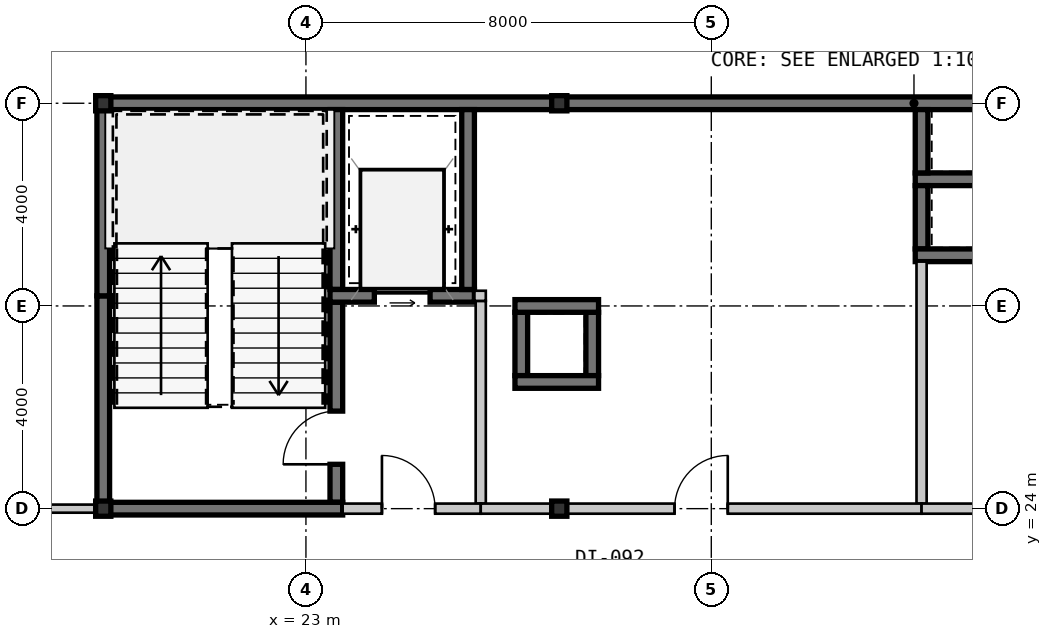
"""IFC4 building model, lengths in metres.
Left out: names, types, materials, properties, quantities, classifications, styles, units other than length and angle.
Written with IfcOpenShell. Run it as: python <this file> out.ifc"""

import sys

from ifc_helpers import new_model, si_unit, direction, frame, frame_2d, origin, origin_2d, place, context, subcontext, project, spatial, rectangle, hollow_rectangle, extrude, source, transform, mapped, element, fill, save


model = new_model("IFC4")
c1 = context("Model", 3, precision=1e-05, world=origin(), true_north=direction((0.0, 1.0)))
c2 = subcontext(c1, "Body", "Model", "MODEL_VIEW")
j1 = project(units=[si_unit("LENGTHUNIT", "METRE"), si_unit("PLANEANGLEUNIT", "RADIAN")], contexts=[c1])
p1 = place(None, origin())
s1 = spatial("IfcSite", under=j1, at=p1, CompositionType="ELEMENT")
p2 = place(p1, origin())
s2 = spatial("IfcBuilding", under=s1, at=p2, CompositionType="ELEMENT")
p3 = place(p2, frame((0.0, 0.0, 249.2)))
s3 = spatial("IfcBuildingStorey", under=s2, at=p3, CompositionType="ELEMENT", Elevation=249.2)
m1 = source(origin(), c2, "Body", "SweptSolid", [
    extrude(hollow_rectangle(XDim=0.3, YDim=0.3, WallThickness=0.012, at=origin_2d()), origin(), (0.0, 0.0, 1.0), 3.85),
])
for number, where, z_axis, x_axis in (
    (1, (19.0, 24.0, 0.0), (0.0, 0.0, 1.0), (1.0, 0.0, 0.0)),
    (2, (28.0, 24.0, 0.0), (0.0, 0.0, 1.0), (1.0, 0.0, 0.0)),
    (3, (19.0, 32.0, 0.0), (0.0, 0.0, 1.0), (1.0, 0.0, 0.0)),
    (4, (28.0, 32.0, 0.0), (0.0, 0.0, 1.0), (1.0, 0.0, 0.0)),
):
    element("IfcColumn", number, at=place(p3, frame(where, z_axis=z_axis, x_axis=x_axis)), inside=s3, PredefinedType="COLUMN", context=c2, shape_type="MappedRepresentation", body=[
        mapped(m1, transform((0.0, 0.0, 0.0), scale=1.0)),
    ])
m2 = source(origin(), c2, "Body", "SweptSolid", [
    extrude(rectangle(XDim=9.125, YDim=0.25, at=frame_2d((4.562, 0.0))), origin(), (0.0, 0.0, 1.0), 3.57),
])
p4 = place(p3, frame((18.875, 32.0, 0.0), z_axis=(0.0, 0.0, 1.0), x_axis=(1.0, 0.0, 0.0)))
e5 = element("IfcWall", 5, at=p4, inside=s3, PredefinedType="SHEAR", context=c2, shape_type="MappedRepresentation", body=[
    mapped(m2, transform((0.0, 0.0, 0.0), scale=1.0)),
])
m3 = source(origin(), c2, "Body", "SweptSolid", [
    extrude(rectangle(XDim=11.2, YDim=0.25, at=frame_2d((5.6, 0.0))), origin(), (0.0, 0.0, 1.0), 3.57),
])
p5 = place(p3, frame((28.0, 32.0, 0.0), z_axis=(0.0, 0.0, 1.0), x_axis=(1.0, 0.0, 0.0)))
e6 = element("IfcWall", 6, at=p5, inside=s3, PredefinedType="SHEAR", context=c2, shape_type="MappedRepresentation", body=[
    mapped(m3, transform((0.0, 0.0, 0.0), scale=1.0)),
])
m4 = source(origin(), c2, "Body", "SweptSolid", [
    extrude(rectangle(XDim=4.075, YDim=0.25, at=frame_2d((2.038, 0.0))), origin(), (0.0, 0.0, 1.0), 3.57),
])
p6 = place(p3, frame((19.0, 24.125, 0.0), z_axis=(0.0, 0.0, 1.0), x_axis=(0.0, 1.0, 0.0)))
e7 = element("IfcWall", 7, at=p6, inside=s3, PredefinedType="SHEAR", context=c2, shape_type="MappedRepresentation", body=[
    mapped(m4, transform((0.0, 0.0, 0.0), scale=1.0)),
])
m5 = source(origin(), c2, "Body", "SweptSolid", [
    extrude(rectangle(XDim=3.675, YDim=0.25, at=frame_2d((1.837, 0.0))), origin(), (0.0, 0.0, 1.0), 3.57),
])
p7 = place(p3, frame((19.0, 28.2, 0.0), z_axis=(0.0, 0.0, 1.0), x_axis=(0.0, 1.0, 0.0)))
e8 = element("IfcWall", 8, at=p7, inside=s3, PredefinedType="SHEAR", context=c2, shape_type="MappedRepresentation", body=[
    mapped(m5, transform((0.0, 0.0, 0.0), scale=1.0)),
])
m6 = source(origin(), c2, "Body", "SweptSolid", [
    extrude(rectangle(XDim=3.55, YDim=0.25, at=frame_2d((1.775, 0.0))), origin(), (0.0, 0.0, 1.0), 3.57),
])
p8 = place(p3, frame((23.6, 28.325, 0.0), z_axis=(0.0, 0.0, 1.0), x_axis=(0.0, 1.0, 0.0)))
e9 = element("IfcWall", 9, at=p8, inside=s3, PredefinedType="SHEAR", context=c2, shape_type="MappedRepresentation", body=[
    mapped(m6, transform((0.0, 0.0, 0.0), scale=1.0)),
])
m7 = source(origin(), c2, "Body", "SweptSolid", [
    extrude(rectangle(XDim=3.95, YDim=0.25, at=frame_2d((1.975, 0.0))), origin(), (0.0, 0.0, 1.0), 3.57),
])
p9 = place(p3, frame((23.6, 24.125, 0.0), z_axis=(0.0, 0.0, 1.0), x_axis=(0.0, 1.0, 0.0)))
e10 = element("IfcWall", 10, at=p9, inside=s3, PredefinedType="SHEAR", context=c2, shape_type="MappedRepresentation", body=[
    mapped(m7, transform((0.0, 0.0, 0.0), scale=1.0)),
])
m8 = source(origin(), c2, "Body", "SweptSolid", [
    extrude(rectangle(XDim=1.05, YDim=2.1, at=frame_2d((0.525, 1.05))), frame((0.0, 0.135, 0.0), z_axis=(0.0, -1.0, 0.0), x_axis=(1.0, 0.0, 0.0)), (0.0, 0.0, 1.0), 0.27),
])
p10 = place(p9, frame((0.75, 0.0, 0.0)))
e11 = element("IfcOpeningElement", 11, at=p10, cuts=e10, PredefinedType="OPENING", context=c2, shape_type="MappedRepresentation", body=[
    mapped(m8, transform((0.0, 0.0, 0.0), scale=1.0)),
])
m9 = source(origin(), c2, "Body", "SweptSolid", [
    extrude(rectangle(XDim=4.85, YDim=0.25, at=frame_2d((2.425, 0.0))), origin(), (0.0, 0.0, 1.0), 3.57),
])
p11 = place(p3, frame((18.875, 24.0, 0.0), z_axis=(0.0, 0.0, 1.0), x_axis=(1.0, 0.0, 0.0)))
e12 = element("IfcWall", 12, at=p11, inside=s3, PredefinedType="SHEAR", context=c2, shape_type="MappedRepresentation", body=[
    mapped(m9, transform((0.0, 0.0, 0.0), scale=1.0)),
])
m10 = source(origin(), c2, "Body", "SweptSolid", [
    extrude(rectangle(XDim=2.85, YDim=0.25, at=frame_2d((1.425, 0.0))), origin(), (0.0, 0.0, 1.0), 3.57),
])
p12 = place(p3, frame((23.475, 28.2, 0.0), z_axis=(0.0, 0.0, 1.0), x_axis=(1.0, 0.0, 0.0)))
e13 = element("IfcWall", 13, at=p12, inside=s3, PredefinedType="SHEAR", context=c2, shape_type="MappedRepresentation", body=[
    mapped(m10, transform((0.0, 0.0, 0.0), scale=1.0)),
])
m11 = source(origin(), c2, "Body", "SweptSolid", [
    extrude(rectangle(XDim=1.1, YDim=2.15, at=frame_2d((0.55, 1.075))), frame((0.0, 0.135, 0.0), z_axis=(0.0, -1.0, 0.0), x_axis=(1.0, 0.0, 0.0)), (0.0, 0.0, 1.0), 0.27),
])
p13 = place(p12, frame((0.875, 0.0, 0.0)))
e14 = element("IfcOpeningElement", 14, at=p13, cuts=e13, PredefinedType="OPENING", context=c2, shape_type="MappedRepresentation", body=[
    mapped(m11, transform((0.0, 0.0, 0.0), scale=1.0)),
])
p14 = place(p3, frame((26.2, 28.325, 0.0), z_axis=(0.0, 0.0, 1.0), x_axis=(0.0, 1.0, 0.0)))
e15 = element("IfcWall", 15, at=p14, inside=s3, PredefinedType="SHEAR", context=c2, shape_type="MappedRepresentation", body=[
    mapped(m6, transform((0.0, 0.0, 0.0), scale=1.0)),
])
m12 = source(origin(), c2, "Body", "SweptSolid", [
    extrude(rectangle(XDim=4.0, YDim=0.2, at=frame_2d((2.0, 0.0))), origin(), (0.0, 0.0, 1.0), 3.57),
])
p15 = place(p3, frame((26.45, 24.1, 0.0), z_axis=(0.0, 0.0, 1.0), x_axis=(0.0, 1.0, 0.0)))
e16 = element("IfcWall", 16, at=p15, inside=s3, PredefinedType="SOLIDWALL", context=c2, shape_type="MappedRepresentation", body=[
    mapped(m12, transform((0.0, 0.0, 0.0), scale=1.0)),
])
m13 = source(origin(), c2, "Body", "SweptSolid", [
    extrude(rectangle(XDim=2.725, YDim=0.2, at=frame_2d((1.362, 0.0))), origin(), (0.0, 0.0, 1.0), 3.11),
])
p16 = place(p3, frame((23.725, 24.0, 0.0), z_axis=(0.0, 0.0, 1.0), x_axis=(1.0, 0.0, 0.0)))
e17 = element("IfcWall", 17, at=p16, inside=s3, PredefinedType="SOLIDWALL", context=c2, shape_type="MappedRepresentation", body=[
    mapped(m13, transform((0.0, 0.0, 0.0), scale=1.0)),
])
m14 = source(origin(), c2, "Body", "SweptSolid", [
    extrude(rectangle(XDim=1.05, YDim=2.1, at=frame_2d((0.525, 1.05))), frame((0.0, 0.11, 0.0), z_axis=(0.0, -1.0, 0.0), x_axis=(1.0, 0.0, 0.0)), (0.0, 0.0, 1.0), 0.22),
])
p17 = place(p16, frame((0.775, 0.0, 0.0)))
e18 = element("IfcOpeningElement", 18, at=p17, cuts=e17, PredefinedType="OPENING", context=c2, shape_type="MappedRepresentation", body=[
    mapped(m14, transform((0.0, 0.0, 0.0), scale=1.0)),
])
m15 = source(origin(), c2, "Body", "SweptSolid", [
    extrude(rectangle(XDim=1.95, YDim=0.25, at=frame_2d((0.975, 0.0))), origin(), (0.0, 0.0, 1.0), 3.57),
])
p18 = place(p3, frame((35.025, 30.5, 0.0), z_axis=(0.0, 0.0, 1.0), x_axis=(1.0, 0.0, 0.0)))
e19 = element("IfcWall", 19, at=p18, inside=s3, PredefinedType="SHEAR", context=c2, shape_type="MappedRepresentation", body=[
    mapped(m15, transform((0.0, 0.0, 0.0), scale=1.0)),
])
m16 = source(origin(), c2, "Body", "SweptSolid", [
    extrude(rectangle(XDim=1.25, YDim=0.25, at=frame_2d((0.625, 0.0))), origin(), (0.0, 0.0, 1.0), 3.57),
])
for number, where, z_axis, x_axis in (
    (20, (35.15, 31.875, 0.0), (0.0, 0.0, 1.0), (0.0, -1.0, 0.0)),
    (21, (35.15, 30.375, 0.0), (0.0, 0.0, 1.0), (0.0, -1.0, 0.0)),
):
    element("IfcWall", number, at=place(p3, frame(where, z_axis=z_axis, x_axis=x_axis)), inside=s3, PredefinedType="SHEAR", context=c2, shape_type="MappedRepresentation", body=[
        mapped(m16, transform((0.0, 0.0, 0.0), scale=1.0)),
    ])
p19 = place(p3, frame((35.025, 29.0, 0.0), z_axis=(0.0, 0.0, 1.0), x_axis=(1.0, 0.0, 0.0)))
e22 = element("IfcWall", 22, at=p19, inside=s3, PredefinedType="SHEAR", context=c2, shape_type="MappedRepresentation", body=[
    mapped(m15, transform((0.0, 0.0, 0.0), scale=1.0)),
])
for number, where, z_axis, x_axis in (
    (23, (28.65, 26.625, 0.0), (0.0, 0.0, 1.0), (0.0, 1.0, 0.0)),
    (24, (27.25, 27.875, 0.0), (0.0, 0.0, 1.0), (0.0, -1.0, 0.0)),
):
    element("IfcWall", number, at=place(p3, frame(where, z_axis=z_axis, x_axis=x_axis)), inside=s3, PredefinedType="SHEAR", context=c2, shape_type="MappedRepresentation", body=[
        mapped(m16, transform((0.0, 0.0, 0.0), scale=1.0)),
    ])
m17 = source(origin(), c2, "Body", "SweptSolid", [
    extrude(rectangle(XDim=1.65, YDim=0.25, at=frame_2d((0.825, 0.0))), origin(), (0.0, 0.0, 1.0), 3.57),
])
for number, where, z_axis, x_axis in (
    (25, (28.775, 28.0, 0.0), (0.0, 0.0, 1.0), (-1.0, 0.0, 0.0)),
    (26, (27.125, 26.5, 0.0), (0.0, 0.0, 1.0), (1.0, 0.0, 0.0)),
):
    element("IfcWall", number, at=place(p3, frame(where, z_axis=z_axis, x_axis=x_axis)), inside=s3, PredefinedType="SHEAR", context=c2, shape_type="MappedRepresentation", body=[
        mapped(m17, transform((0.0, 0.0, 0.0), scale=1.0)),
    ])
m18 = source(origin(), c2, "Body", "SweptSolid", [
    extrude(rectangle(XDim=4.775, YDim=0.2, at=frame_2d((2.387, 0.0))), origin(), (0.0, 0.0, 1.0), 3.57),
])
p20 = place(p3, frame((35.15, 28.875, 0.0), z_axis=(0.0, 0.0, 1.0), x_axis=(0.0, -1.0, 0.0)))
e27 = element("IfcWall", 27, at=p20, inside=s3, PredefinedType="SOLIDWALL", context=c2, shape_type="MappedRepresentation", body=[
    mapped(m18, transform((0.0, 0.0, 0.0), scale=1.0)),
])
m19 = source(origin(), c2, "Body", "SweptSolid", [
    extrude(rectangle(XDim=8.7, YDim=0.2, at=frame_2d((4.35, 0.0))), origin(), (0.0, 0.0, 1.0), 3.11),
])
p21 = place(p3, frame((35.15, 24.0, 0.0), z_axis=(0.0, 0.0, 1.0), x_axis=(-1.0, 0.0, 0.0)))
e28 = element("IfcWall", 28, at=p21, inside=s3, PredefinedType="SOLIDWALL", context=c2, shape_type="MappedRepresentation", body=[
    mapped(m19, transform((0.0, 0.0, 0.0), scale=1.0)),
])
p22 = place(p21, frame((3.825, 0.0, 0.0)))
e29 = element("IfcOpeningElement", 29, at=p22, cuts=e28, PredefinedType="OPENING", context=c2, shape_type="MappedRepresentation", body=[
    mapped(m14, transform((0.0, 0.0, 0.0), scale=1.0)),
])
m20 = source(origin(), c2, "Body", "SweptSolid", [
    extrude(rectangle(XDim=4.05, YDim=0.2, at=frame_2d((2.025, 0.0))), origin(), (0.0, 0.0, 1.0), 3.11),
])
p23 = place(p3, frame((39.2, 24.0, 0.0), z_axis=(0.0, 0.0, 1.0), x_axis=(-1.0, 0.0, 0.0)))
e30 = element("IfcWall", 30, at=p23, inside=s3, PredefinedType="SOLIDWALL", context=c2, shape_type="MappedRepresentation", body=[
    mapped(m20, transform((0.0, 0.0, 0.0), scale=1.0)),
])
p24 = place(p23, frame((1.5, 0.0, 0.0)))
e31 = element("IfcOpeningElement", 31, at=p24, cuts=e30, PredefinedType="OPENING", context=c2, shape_type="MappedRepresentation", body=[
    mapped(m14, transform((0.0, 0.0, 0.0), scale=1.0)),
])
m21 = source(origin(), c2, "Body", "SweptSolid", [
    extrude(rectangle(XDim=6.032, YDim=0.16, at=frame_2d((3.016, 0.0))), origin(), (0.0, 0.0, 1.0), 3.57),
])
p25 = place(p3, frame((12.843, 24.0, 0.0), z_axis=(0.0, 0.0, 1.0), x_axis=(1.0, 0.0, 0.0)))
e32 = element("IfcWall", 32, at=p25, inside=s3, PredefinedType="PARTITIONING", context=c2, shape_type="MappedRepresentation", body=[
    mapped(m21, transform((0.0, 0.0, 0.0), scale=1.0)),
])
m22 = source(origin(), c2, "Body", "SweptSolid", [
    extrude(rectangle(XDim=0.225, YDim=0.2, at=frame_2d((0.113, 0.0))), origin(), (0.0, 0.0, 1.0), 3.57),
])
p26 = place(p3, frame((26.325, 28.2, 0.0), z_axis=(0.0, 0.0, 1.0), x_axis=(1.0, 0.0, 0.0)))
e33 = element("IfcWall", 33, at=p26, inside=s3, PredefinedType="SOLIDWALL", context=c2, shape_type="MappedRepresentation", body=[
    mapped(m22, transform((0.0, 0.0, 0.0), scale=1.0)),
])
m23 = source(origin(), c2, "Body", "SweptSolid", [
    extrude(rectangle(XDim=1.05, YDim=2.1, at=frame_2d((0.525, 1.05))), frame((0.0, 0.025, 0.0), z_axis=(0.0, -1.0, 0.0), x_axis=(1.0, 0.0, 0.0)), (0.0, 0.0, 1.0), 0.05),
])
p27 = place(p10, origin())
e34 = element("IfcDoor", 34, at=p27, inside=s3, OperationType="SINGLE_SWING_LEFT", PredefinedType="DOOR", context=c2, shape_type="MappedRepresentation", body=[
    mapped(m23, transform((0.0, 0.0, 0.0), scale=1.0)),
])
fill(e11, e34)
m24 = source(origin(), c2, "Body", "SweptSolid", [
    extrude(rectangle(XDim=1.1, YDim=2.15, at=frame_2d((0.55, 1.075))), frame((0.0, 0.025, 0.0), z_axis=(0.0, -1.0, 0.0), x_axis=(1.0, 0.0, 0.0)), (0.0, 0.0, 1.0), 0.05),
])
p28 = place(p13, origin())
e35 = element("IfcDoor", 35, at=p28, inside=s3, OperationType="SLIDING_TO_LEFT", PredefinedType="DOOR", context=c2, shape_type="MappedRepresentation", body=[
    mapped(m24, transform((0.0, 0.0, 0.0), scale=1.0)),
])
fill(e14, e35)
p29 = place(p17, origin())
e36 = element("IfcDoor", 36, at=p29, inside=s3, OperationType="SINGLE_SWING_LEFT", PredefinedType="DOOR", context=c2, shape_type="MappedRepresentation", body=[
    mapped(m23, transform((0.0, 0.0, 0.0), scale=1.0)),
])
fill(e18, e36)
p30 = place(p22, frame((1.05, 0.0, 0.0), z_axis=(0.0, 0.0, 1.0), x_axis=(-1.0, 0.0, 0.0)))
e37 = element("IfcDoor", 37, at=p30, inside=s3, OperationType="SINGLE_SWING_RIGHT", PredefinedType="DOOR", context=c2, shape_type="MappedRepresentation", body=[
    mapped(m23, transform((0.0, 0.0, 0.0), scale=1.0)),
])
fill(e29, e37)
save(model, sys.argv[1])
